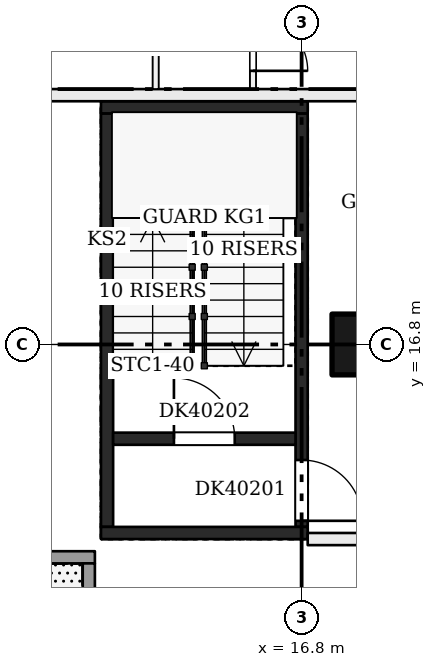
"""IFC4 building model, lengths in metres.
Left out: names, types, materials, properties, quantities, classifications, styles, units other than length and angle.
Written with IfcOpenShell. Run it as: python <this file> out.ifc"""

import sys

from ifc_helpers import new_model, si_unit, direction, frame, frame_2d, origin, origin_2d, place, context, subcontext, project, spatial, rectangle, extrude, element, fill, save


model = new_model("IFC4")
c1 = context("Model", 3, precision=1e-05, world=origin(), true_north=direction((0.0, 1.0)))
c2 = subcontext(c1, "Body", "Model", "MODEL_VIEW")
j1 = project(units=[si_unit("LENGTHUNIT", "METRE"), si_unit("PLANEANGLEUNIT", "RADIAN")], contexts=[c1])
p1 = place(None, origin())
s1 = spatial("IfcSite", under=j1, at=p1, CompositionType="ELEMENT")
p2 = place(p1, origin())
s2 = spatial("IfcBuilding", under=s1, at=p2, CompositionType="ELEMENT")
p3 = place(p2, frame((0.0, 0.0, 158.2)))
s3 = spatial("IfcBuildingStorey", under=s2, at=p3, CompositionType="ELEMENT", Elevation=158.2)
p4 = place(p3, frame((17.8, 16.8, 0.0), z_axis=(0.0, 0.0, 1.0), x_axis=(1.0, 0.0, 0.0)))
e1 = element("IfcColumn", 1, at=p4, inside=s3, PredefinedType="COLUMN", context=c2, shape_type="SweptSolid", body=[
    extrude(rectangle(XDim=1.0, YDim=1.0, at=origin_2d()), origin(), (0.0, 0.0, 1.0), 3.22),
])
p5 = place(p3, frame((13.6, 13.8, 0.0), z_axis=(0.0, 0.0, 1.0), x_axis=(0.0, 1.0, 0.0)))
e2 = element("IfcWall", 2, at=p5, inside=s3, PredefinedType="SHEAR", context=c2, shape_type="SweptSolid", body=[
    extrude(rectangle(XDim=6.8, YDim=0.2, at=frame_2d((3.4, 0.0))), origin(), (0.0, 0.0, 1.0), 3.22),
])
p6 = place(p3, frame((16.8, 13.8, 0.0), z_axis=(0.0, 0.0, 1.0), x_axis=(0.0, 1.0, 0.0)))
e3 = element("IfcWall", 3, at=p6, inside=s3, PredefinedType="SHEAR", context=c2, shape_type="SweptSolid", body=[
    extrude(rectangle(XDim=6.8, YDim=0.2, at=frame_2d((3.4, 0.0))), origin(), (0.0, 0.0, 1.0), 3.22),
])
p7 = place(p6, frame((0.1, 0.0, 0.0)))
e4 = element("IfcOpeningElement", 4, at=p7, cuts=e3, PredefinedType="OPENING", context=c2, shape_type="SweptSolid", body=[
    extrude(rectangle(XDim=1.0, YDim=2.1, at=frame_2d((0.5, 1.05))), frame((0.0, 0.11, 0.0), z_axis=(0.0, -1.0, 0.0), x_axis=(1.0, 0.0, 0.0)), (0.0, 0.0, 1.0), 0.22),
])
for number, where, z_axis, x_axis in (
    (5, (13.5, 13.7, 0.0), (0.0, 0.0, 1.0), (1.0, 0.0, 0.0)),
    (6, (13.5, 20.7, 0.0), (0.0, 0.0, 1.0), (1.0, 0.0, 0.0)),
):
    element("IfcWall", number, at=place(p3, frame(where, z_axis=z_axis, x_axis=x_axis)), inside=s3, PredefinedType="SHEAR", context=c2, shape_type="SweptSolid", body=[
        extrude(rectangle(XDim=3.4, YDim=0.2, at=frame_2d((1.7, 0.0))), origin(), (0.0, 0.0, 1.0), 3.22),
    ])
p8 = place(p3, frame((13.7, 15.25, 0.0), z_axis=(0.0, 0.0, 1.0), x_axis=(1.0, 0.0, 0.0)))
e7 = element("IfcWall", 7, at=p8, inside=s3, PredefinedType="SHEAR", context=c2, shape_type="SweptSolid", body=[
    extrude(rectangle(XDim=3.0, YDim=0.2, at=frame_2d((1.5, 0.0))), origin(), (0.0, 0.0, 1.0), 3.22),
])
p9 = place(p8, frame((1.0, 0.0, 0.0)))
e8 = element("IfcOpeningElement", 8, at=p9, cuts=e7, PredefinedType="OPENING", context=c2, shape_type="SweptSolid", body=[
    extrude(rectangle(XDim=1.0, YDim=2.1, at=frame_2d((0.5, 1.05))), frame((0.0, 0.11, 0.0), z_axis=(0.0, -1.0, 0.0), x_axis=(1.0, 0.0, 0.0)), (0.0, 0.0, 1.0), 0.22),
])
p10 = place(p3, frame((16.9, 13.6, 0.0), z_axis=(0.0, 0.0, 1.0), x_axis=(1.0, 0.0, 0.0)))
e9 = element("IfcWall", 9, at=p10, inside=s3, PredefinedType="PARTITIONING", context=c2, shape_type="SweptSolid", body=[
    extrude(rectangle(XDim=4.2, YDim=0.2, at=frame_2d((2.1, 0.0))), origin(), (0.0, 0.0, 1.0), 3.22),
])
p11 = place(p10, frame((1.6, 0.0, 0.0)))
e10 = element("IfcOpeningElement", 10, at=p11, cuts=e9, PredefinedType="OPENING", context=c2, shape_type="SweptSolid", body=[
    extrude(rectangle(XDim=1.0, YDim=2.1, at=frame_2d((0.5, 1.05))), frame((0.0, 0.11, 0.0), z_axis=(0.0, -1.0, 0.0), x_axis=(1.0, 0.0, 0.0)), (0.0, 0.0, 1.0), 0.22),
])
p12 = place(p3, frame((10.9, 20.9, 0.0), z_axis=(0.0, 0.0, 1.0), x_axis=(1.0, 0.0, 0.0)))
e11 = element("IfcWall", 11, at=p12, inside=s3, PredefinedType="PARTITIONING", context=c2, shape_type="SweptSolid", body=[
    extrude(rectangle(XDim=8.3, YDim=0.2, at=frame_2d((4.15, 0.0))), origin(), (0.0, 0.0, 1.0), 3.22),
])
p13 = place(p3, frame((14.4, 21.0, 0.0), z_axis=(0.0, 0.0, 1.0), x_axis=(0.0, 1.0, 0.0)))
e12 = element("IfcWall", 12, at=p13, inside=s3, PredefinedType="PARTITIONING", context=c2, shape_type="SweptSolid", body=[
    extrude(rectangle(XDim=19.0, YDim=0.1, at=frame_2d((9.5, 0.0))), origin(), (0.0, 0.0, 1.0), 3.22),
])
p14 = place(p13, frame((1.6, 0.0, 0.0)))
e13 = element("IfcOpeningElement", 13, at=p14, cuts=e12, PredefinedType="OPENING", context=c2, shape_type="SweptSolid", body=[
    extrude(rectangle(XDim=0.9, YDim=2.1, at=frame_2d((0.45, 1.05))), frame((0.0, 0.06, 0.0), z_axis=(0.0, -1.0, 0.0), x_axis=(1.0, 0.0, 0.0)), (0.0, 0.0, 1.0), 0.12),
])
p15 = place(p13, frame((5.8, 0.0, 0.0)))
e14 = element("IfcOpeningElement", 14, at=p15, cuts=e12, PredefinedType="OPENING", context=c2, shape_type="SweptSolid", body=[
    extrude(rectangle(XDim=0.9, YDim=2.1, at=frame_2d((0.45, 1.05))), frame((0.0, 0.06, 0.0), z_axis=(0.0, -1.0, 0.0), x_axis=(1.0, 0.0, 0.0)), (0.0, 0.0, 1.0), 0.12),
])
p16 = place(p13, frame((10.0, 0.0, 0.0)))
e15 = element("IfcOpeningElement", 15, at=p16, cuts=e12, PredefinedType="OPENING", context=c2, shape_type="SweptSolid", body=[
    extrude(rectangle(XDim=0.9, YDim=2.1, at=frame_2d((0.45, 1.05))), frame((0.0, 0.06, 0.0), z_axis=(0.0, -1.0, 0.0), x_axis=(1.0, 0.0, 0.0)), (0.0, 0.0, 1.0), 0.12),
])
p17 = place(p13, frame((15.4, 0.0, 0.0)))
e16 = element("IfcOpeningElement", 16, at=p17, cuts=e12, PredefinedType="OPENING", context=c2, shape_type="SweptSolid", body=[
    extrude(rectangle(XDim=0.9, YDim=2.1, at=frame_2d((0.45, 1.05))), frame((0.0, 0.06, 0.0), z_axis=(0.0, -1.0, 0.0), x_axis=(1.0, 0.0, 0.0)), (0.0, 0.0, 1.0), 0.12),
])
p18 = place(p3, frame((16.0, 21.0, 0.0), z_axis=(0.0, 0.0, 1.0), x_axis=(0.0, 1.0, 0.0)))
e17 = element("IfcWall", 17, at=p18, inside=s3, PredefinedType="PARTITIONING", context=c2, shape_type="SweptSolid", body=[
    extrude(rectangle(XDim=19.0, YDim=0.1, at=frame_2d((9.5, 0.0))), origin(), (0.0, 0.0, 1.0), 3.22),
])
p19 = place(p18, frame((2.6, 0.0, 0.0)))
e18 = element("IfcOpeningElement", 18, at=p19, cuts=e17, PredefinedType="OPENING", context=c2, shape_type="SweptSolid", body=[
    extrude(rectangle(XDim=0.9, YDim=2.1, at=frame_2d((0.45, 1.05))), frame((0.0, 0.06, 0.0), z_axis=(0.0, -1.0, 0.0), x_axis=(1.0, 0.0, 0.0)), (0.0, 0.0, 1.0), 0.12),
])
p20 = place(p18, frame((0.3, 0.0, 0.0)))
e19 = element("IfcOpeningElement", 19, at=p20, cuts=e17, PredefinedType="OPENING", context=c2, shape_type="SweptSolid", body=[
    extrude(rectangle(XDim=0.9, YDim=2.1, at=frame_2d((0.45, 1.05))), frame((0.0, 0.06, 0.0), z_axis=(0.0, -1.0, 0.0), x_axis=(1.0, 0.0, 0.0)), (0.0, 0.0, 1.0), 0.12),
])
p21 = place(p18, frame((5.433, 0.0, 0.0)))
e20 = element("IfcOpeningElement", 20, at=p21, cuts=e17, PredefinedType="OPENING", context=c2, shape_type="SweptSolid", body=[
    extrude(rectangle(XDim=0.9, YDim=2.1, at=frame_2d((0.45, 1.05))), frame((0.0, 0.06, 0.0), z_axis=(0.0, -1.0, 0.0), x_axis=(1.0, 0.0, 0.0)), (0.0, 0.0, 1.0), 0.12),
])
p22 = place(p18, frame((8.367, 0.0, 0.0)))
e21 = element("IfcOpeningElement", 21, at=p22, cuts=e17, PredefinedType="OPENING", context=c2, shape_type="SweptSolid", body=[
    extrude(rectangle(XDim=0.9, YDim=2.1, at=frame_2d((0.45, 1.05))), frame((0.0, 0.06, 0.0), z_axis=(0.0, -1.0, 0.0), x_axis=(1.0, 0.0, 0.0)), (0.0, 0.0, 1.0), 0.12),
])
p23 = place(p18, frame((11.0, 0.0, 0.0)))
e22 = element("IfcOpeningElement", 22, at=p23, cuts=e17, PredefinedType="OPENING", context=c2, shape_type="SweptSolid", body=[
    extrude(rectangle(XDim=0.9, YDim=2.1, at=frame_2d((0.45, 1.05))), frame((0.0, 0.06, 0.0), z_axis=(0.0, -1.0, 0.0), x_axis=(1.0, 0.0, 0.0)), (0.0, 0.0, 1.0), 0.12),
])
p24 = place(p18, frame((13.933, 0.0, 0.0)))
e23 = element("IfcOpeningElement", 23, at=p24, cuts=e17, PredefinedType="OPENING", context=c2, shape_type="SweptSolid", body=[
    extrude(rectangle(XDim=0.9, YDim=2.1, at=frame_2d((0.45, 1.05))), frame((0.0, 0.06, 0.0), z_axis=(0.0, -1.0, 0.0), x_axis=(1.0, 0.0, 0.0)), (0.0, 0.0, 1.0), 0.12),
])
p25 = place(p18, frame((16.867, 0.0, 0.0)))
e24 = element("IfcOpeningElement", 24, at=p25, cuts=e17, PredefinedType="OPENING", context=c2, shape_type="SweptSolid", body=[
    extrude(rectangle(XDim=0.9, YDim=2.1, at=frame_2d((0.45, 1.05))), frame((0.0, 0.06, 0.0), z_axis=(0.0, -1.0, 0.0), x_axis=(1.0, 0.0, 0.0)), (0.0, 0.0, 1.0), 0.12),
])
p26 = place(p3, frame((10.8, 13.3, 0.0), z_axis=(0.0, 0.0, 1.0), x_axis=(1.0, 0.0, 0.0)))
e25 = element("IfcWall", 25, at=p26, inside=s3, PredefinedType="SOLIDWALL", context=c2, shape_type="SweptSolid", body=[
    extrude(rectangle(XDim=2.6, YDim=0.2, at=frame_2d((1.3, 0.0))), origin(), (0.0, 0.0, 1.0), 3.22),
])
p27 = place(p3, frame((13.3, 13.2, 0.0), z_axis=(0.0, 0.0, 1.0), x_axis=(0.0, -1.0, 0.0)))
e26 = element("IfcWall", 26, at=p27, inside=s3, PredefinedType="SOLIDWALL", context=c2, shape_type="SweptSolid", body=[
    extrude(rectangle(XDim=2.2, YDim=0.2, at=frame_2d((1.1, 0.0))), origin(), (0.0, 0.0, 1.0), 3.22),
])
p28 = place(p7, frame((1.0, 0.0, 0.0), z_axis=(0.0, 0.0, 1.0), x_axis=(-1.0, 0.0, 0.0)))
e27 = element("IfcDoor", 27, at=p28, inside=s3, OperationType="SINGLE_SWING_RIGHT", PredefinedType="DOOR", context=c2, shape_type="SweptSolid", body=[
    extrude(rectangle(XDim=1.0, YDim=2.1, at=frame_2d((0.5, 1.05))), frame((0.0, 0.025, 0.0), z_axis=(0.0, -1.0, 0.0), x_axis=(1.0, 0.0, 0.0)), (0.0, 0.0, 1.0), 0.05),
])
fill(e4, e27)
p29 = place(p9, origin())
e28 = element("IfcDoor", 28, at=p29, inside=s3, OperationType="SINGLE_SWING_LEFT", PredefinedType="DOOR", context=c2, shape_type="SweptSolid", body=[
    extrude(rectangle(XDim=1.0, YDim=2.1, at=frame_2d((0.5, 1.05))), frame((0.0, 0.025, 0.0), z_axis=(0.0, -1.0, 0.0), x_axis=(1.0, 0.0, 0.0)), (0.0, 0.0, 1.0), 0.05),
])
fill(e8, e28)
p30 = place(p20, frame((0.9, 0.0, 0.0), z_axis=(0.0, 0.0, 1.0), x_axis=(-1.0, 0.0, 0.0)))
e29 = element("IfcDoor", 29, at=p30, inside=s3, OperationType="SINGLE_SWING_RIGHT", PredefinedType="DOOR", context=c2, shape_type="SweptSolid", body=[
    extrude(rectangle(XDim=0.9, YDim=2.1, at=frame_2d((0.45, 1.05))), frame((0.0, 0.025, 0.0), z_axis=(0.0, -1.0, 0.0), x_axis=(1.0, 0.0, 0.0)), (0.0, 0.0, 1.0), 0.05),
])
fill(e19, e29)
save(model, sys.argv[1])
